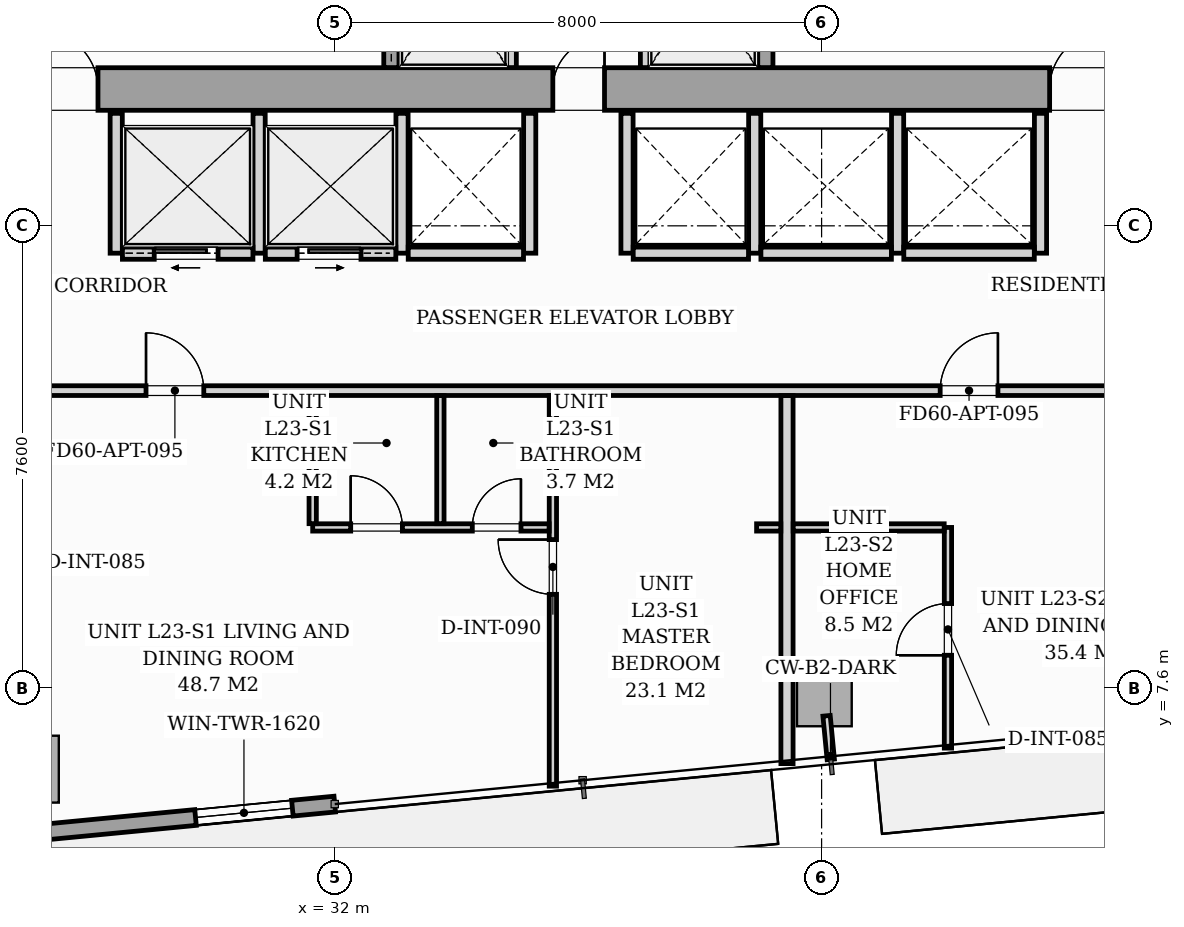
"""IFC4 building model, lengths in metres.
Left out: names, types, materials, properties, quantities, classifications, styles, units other than length and angle.
Written with IfcOpenShell. Run it as: python <this file> out.ifc"""

import sys

from ifc_helpers import new_model, si_unit, direction, frame, frame_2d, origin, origin_2d, place, context, subcontext, project, spatial, rectangle, i_section, extrude, source, transform, mapped, element, fill, save


model = new_model("IFC4")
c1 = context("Model", 3, precision=1e-05, world=origin(), true_north=direction((0.0, 1.0)))
c2 = subcontext(c1, "Body", "Model", "MODEL_VIEW")
j1 = project(units=[si_unit("LENGTHUNIT", "METRE"), si_unit("PLANEANGLEUNIT", "RADIAN")], contexts=[c1])
p1 = place(None, origin())
s1 = spatial("IfcSite", under=j1, at=p1, CompositionType="ELEMENT")
p2 = place(p1, origin())
s2 = spatial("IfcBuilding", under=s1, at=p2, CompositionType="ELEMENT")
p3 = place(p2, frame((0.0, 0.0, 84.2)))
s3 = spatial("IfcBuildingStorey", under=s2, at=p3, CompositionType="ELEMENT", Elevation=84.2)
m1 = source(origin(), c2, "Body", "SweptSolid", [
    extrude(i_section(OverallWidth=0.427, OverallDepth=0.483, WebThickness=0.051, FlangeThickness=0.082, FilletRadius=0.018, at=origin_2d()), origin(), (0.0, 0.0, 1.0), 3.196),
])
for number, where, z_axis, x_axis in (
    (1, (33.12, 17.4, 0.002), (0.0, 0.0, 1.0), (1.0, 0.0, 0.0)),
    (2, (38.88, 17.4, 0.002), (0.0, 0.0, 1.0), (1.0, 0.0, 0.0)),
):
    element("IfcColumn", number, at=place(p3, frame(where, z_axis=z_axis, x_axis=x_axis)), inside=s3, PredefinedType="PILASTER", context=c2, shape_type="MappedRepresentation", body=[
        mapped(m1, transform((0.0, 0.0, 0.0), scale=1.0)),
    ])
m2 = source(origin(), c2, "Body", "SweptSolid", [
    extrude(rectangle(XDim=0.9, YDim=1.1, at=origin_2d()), origin(), (0.0, 0.0, 1.0), 3.196),
])
for number, where, z_axis, x_axis in (
    (3, (27.006, 6.265, 0.002), (0.0, 0.0, 1.0), (0.995, 0.096, 0.0)),
    (4, (40.045, 7.521, 0.002), (0.0, 0.0, 1.0), (0.995, 0.096, 0.0)),
):
    element("IfcColumn", number, at=place(p3, frame(where, z_axis=z_axis, x_axis=x_axis)), inside=s3, PredefinedType="COLUMN", context=c2, shape_type="MappedRepresentation", body=[
        mapped(m2, transform((0.0, 0.0, 0.0), scale=1.0)),
    ])
p4 = place(p3, frame((31.994, 5.69, 0.0), z_axis=(0.0, 0.0, 1.0), x_axis=(-0.995396521236, -0.095842399342, 0.0)))
e5 = element("IfcWall", 5, at=p4, inside=s3, PredefinedType="STANDARD", context=c2, shape_type="SweptSolid", body=[
    extrude(rectangle(XDim=19.11, YDim=0.26, at=frame_2d((9.555, 0.0))), origin(), (0.0, 0.0, 1.0), 2.94),
])
p5 = place(p4, frame((7.49, 0.0, 0.0)))
e6 = element("IfcOpeningElement", 6, at=p5, cuts=e5, PredefinedType="OPENING", context=c2, shape_type="SweptSolid", body=[
    extrude(rectangle(XDim=1.8, YDim=2.06, at=frame_2d((0.9, 1.03))), frame((0.0, 0.14, 0.0), z_axis=(0.0, -1.0, 0.0), x_axis=(1.0, 0.0, 0.0)), (0.0, 0.0, 1.0), 0.28),
])
p6 = place(p4, frame((0.7, 0.0, 0.65)))
e7 = element("IfcOpeningElement", 7, at=p6, cuts=e5, PredefinedType="OPENING", context=c2, shape_type="SweptSolid", body=[
    extrude(rectangle(XDim=1.6, YDim=1.5, at=frame_2d((0.8, 0.75))), frame((0.0, 0.14, 0.0), z_axis=(0.0, -1.0, 0.0), x_axis=(1.0, 0.0, 0.0)), (0.0, 0.0, 1.0), 0.28),
])
p7 = place(p3, frame((26.1, 17.45, 0.0), z_axis=(0.0, 0.0, 1.0), x_axis=(1.0, 0.0, 0.0)))
e8 = element("IfcWall", 8, at=p7, inside=s3, PredefinedType="SHEAR", context=c2, shape_type="SweptSolid", body=[
    extrude(rectangle(XDim=19.8, YDim=0.7, at=frame_2d((9.9, 0.0))), origin(), (0.0, 0.0, 1.0), 3.2),
])
p8 = place(p7, frame((1.05, 0.0, 0.0)))
e9 = element("IfcOpeningElement", 9, at=p8, cuts=e8, PredefinedType="OPENING", context=c2, shape_type="SweptSolid", body=[
    extrude(rectangle(XDim=0.95, YDim=2.06, at=frame_2d((0.475, 1.03))), frame((0.0, 0.36, 0.0), z_axis=(0.0, -1.0, 0.0), x_axis=(1.0, 0.0, 0.0)), (0.0, 0.0, 1.0), 0.72),
])
p9 = place(p7, frame((9.48, 0.0, 0.0)))
e10 = element("IfcOpeningElement", 10, at=p9, cuts=e8, PredefinedType="OPENING", context=c2, shape_type="SweptSolid", body=[
    extrude(rectangle(XDim=0.85, YDim=2.0, at=frame_2d((0.425, 1.0))), frame((0.0, 0.36, 0.0), z_axis=(0.0, -1.0, 0.0), x_axis=(1.0, 0.0, 0.0)), (0.0, 0.0, 1.0), 0.72),
])
p10 = place(p7, frame((17.65, 0.0, 0.0)))
e11 = element("IfcOpeningElement", 11, at=p10, cuts=e8, PredefinedType="OPENING", context=c2, shape_type="SweptSolid", body=[
    extrude(rectangle(XDim=0.95, YDim=2.06, at=frame_2d((0.475, 1.03))), frame((0.0, 0.36, 0.0), z_axis=(0.0, -1.0, 0.0), x_axis=(1.0, 0.0, 0.0)), (0.0, 0.0, 1.0), 0.72),
])
p11 = place(p3, frame((32.925, 17.802, 0.0), z_axis=(0.0, 0.0, 1.0), x_axis=(0.0, 1.0, 0.0)))
e12 = element("IfcWall", 12, at=p11, inside=s3, PredefinedType="SOLIDWALL", context=c2, shape_type="SweptSolid", body=[
    extrude(rectangle(XDim=2.646, YDim=0.25, at=frame_2d((1.323, 0.0))), origin(), (0.0, 0.0, 1.0), 3.2),
])
p12 = place(p11, frame((0.598, 0.0, 0.0)))
e13 = element("IfcOpeningElement", 13, at=p12, cuts=e12, PredefinedType="OPENING", context=c2, shape_type="SweptSolid", body=[
    extrude(rectangle(XDim=1.1, YDim=2.08, at=frame_2d((0.55, 1.04))), frame((0.0, 0.135, 0.0), z_axis=(0.0, -1.0, 0.0), x_axis=(1.0, 0.0, 0.0)), (0.0, 0.0, 1.0), 0.27),
])
for number, where, z_axis, x_axis in (
    (14, (34.9, 17.802, 0.0), (0.0, 0.0, 1.0), (0.0, 1.0, 0.0)),
    (15, (37.1, 17.802, 0.0), (0.0, 0.0, 1.0), (0.0, 1.0, 0.0)),
):
    element("IfcWall", number, at=place(p3, frame(where, z_axis=z_axis, x_axis=x_axis)), inside=s3, PredefinedType="PARTITIONING", context=c2, shape_type="SweptSolid", body=[
        extrude(rectangle(XDim=2.646, YDim=0.16, at=frame_2d((1.323, 0.0))), origin(), (0.0, 0.0, 1.0), 2.94),
    ])
p13 = place(p3, frame((39.075, 17.802, 0.0), z_axis=(0.0, 0.0, 1.0), x_axis=(0.0, 1.0, 0.0)))
e16 = element("IfcWall", 16, at=p13, inside=s3, PredefinedType="SOLIDWALL", context=c2, shape_type="SweptSolid", body=[
    extrude(rectangle(XDim=2.646, YDim=0.25, at=frame_2d((1.323, 0.0))), origin(), (0.0, 0.0, 1.0), 3.2),
])
p14 = place(p13, frame((0.598, 0.0, 0.0)))
e17 = element("IfcOpeningElement", 17, at=p14, cuts=e16, PredefinedType="OPENING", context=c2, shape_type="SweptSolid", body=[
    extrude(rectangle(XDim=1.1, YDim=2.08, at=frame_2d((0.55, 1.04))), frame((0.0, 0.135, 0.0), z_axis=(0.0, -1.0, 0.0), x_axis=(1.0, 0.0, 0.0)), (0.0, 0.0, 1.0), 0.27),
])
for number, where, z_axis, x_axis in (
    (18, (28.4, 14.75, 0.0), (0.0, 0.0, 1.0), (0.0, 1.0, 0.0)),
    (19, (30.75, 14.75, 0.0), (0.0, 0.0, 1.0), (0.0, 1.0, 0.0)),
    (20, (33.1, 14.75, 0.0), (0.0, 0.0, 1.0), (0.0, 1.0, 0.0)),
):
    element("IfcWall", number, at=place(p3, frame(where, z_axis=z_axis, x_axis=x_axis)), inside=s3, PredefinedType="PARTITIONING", context=c2, shape_type="SweptSolid", body=[
        extrude(rectangle(XDim=2.3, YDim=0.2, at=frame_2d((1.15, 0.0))), origin(), (0.0, 0.0, 1.0), 2.94),
    ])
p15 = place(p3, frame((28.502, 14.75, 0.0), z_axis=(0.0, 0.0, 1.0), x_axis=(1.0, 0.0, 0.0)))
e21 = element("IfcWall", 21, at=p15, inside=s3, PredefinedType="PARTITIONING", context=c2, shape_type="SweptSolid", body=[
    extrude(rectangle(XDim=2.146, YDim=0.2, at=frame_2d((1.073, 0.0))), origin(), (0.0, 0.0, 1.0), 2.94),
])
p16 = place(p15, frame((0.523, 0.0, 0.0)))
e22 = element("IfcOpeningElement", 22, at=p16, cuts=e21, PredefinedType="OPENING", context=c2, shape_type="SweptSolid", body=[
    extrude(rectangle(XDim=1.05, YDim=2.08, at=frame_2d((0.525, 1.04))), frame((0.0, 0.11, 0.0), z_axis=(0.0, -1.0, 0.0), x_axis=(1.0, 0.0, 0.0)), (0.0, 0.0, 1.0), 0.22),
])
p17 = place(p3, frame((30.852, 14.75, 0.0), z_axis=(0.0, 0.0, 1.0), x_axis=(1.0, 0.0, 0.0)))
e23 = element("IfcWall", 23, at=p17, inside=s3, PredefinedType="PARTITIONING", context=c2, shape_type="SweptSolid", body=[
    extrude(rectangle(XDim=2.146, YDim=0.2, at=frame_2d((1.073, 0.0))), origin(), (0.0, 0.0, 1.0), 2.94),
])
p18 = place(p17, frame((0.523, 0.0, 0.0)))
e24 = element("IfcOpeningElement", 24, at=p18, cuts=e23, PredefinedType="OPENING", context=c2, shape_type="SweptSolid", body=[
    extrude(rectangle(XDim=1.05, YDim=2.08, at=frame_2d((0.525, 1.04))), frame((0.0, 0.11, 0.0), z_axis=(0.0, -1.0, 0.0), x_axis=(1.0, 0.0, 0.0)), (0.0, 0.0, 1.0), 0.22),
])
p19 = place(p3, frame((35.2, 14.75, 0.0), z_axis=(0.0, 0.0, 1.0), x_axis=(0.0, 1.0, 0.0)))
e25 = element("IfcWall", 25, at=p19, inside=s3, PredefinedType="PARTITIONING", context=c2, shape_type="SweptSolid", body=[
    extrude(rectangle(XDim=2.3, YDim=0.2, at=frame_2d((1.15, 0.0))), origin(), (0.0, 0.0, 1.0), 2.94),
])
p20 = place(p3, frame((33.202, 14.75, 0.0), z_axis=(0.0, 0.0, 1.0), x_axis=(1.0, 0.0, 0.0)))
e26 = element("IfcWall", 26, at=p20, inside=s3, PredefinedType="PARTITIONING", context=c2, shape_type="SweptSolid", body=[
    extrude(rectangle(XDim=1.896, YDim=0.2, at=frame_2d((0.948, 0.0))), origin(), (0.0, 0.0, 1.0), 2.94),
])
for number, where, z_axis, x_axis in (
    (27, (36.8, 14.75, 0.0), (0.0, 0.0, 1.0), (0.0, 1.0, 0.0)),
    (28, (38.9, 14.75, 0.0), (0.0, 0.0, 1.0), (0.0, 1.0, 0.0)),
):
    element("IfcWall", number, at=place(p3, frame(where, z_axis=z_axis, x_axis=x_axis)), inside=s3, PredefinedType="PARTITIONING", context=c2, shape_type="SweptSolid", body=[
        extrude(rectangle(XDim=2.3, YDim=0.2, at=frame_2d((1.15, 0.0))), origin(), (0.0, 0.0, 1.0), 2.94),
    ])
p21 = place(p3, frame((36.902, 14.75, 0.0), z_axis=(0.0, 0.0, 1.0), x_axis=(1.0, 0.0, 0.0)))
e29 = element("IfcWall", 29, at=p21, inside=s3, PredefinedType="PARTITIONING", context=c2, shape_type="SweptSolid", body=[
    extrude(rectangle(XDim=1.896, YDim=0.2, at=frame_2d((0.948, 0.0))), origin(), (0.0, 0.0, 1.0), 2.94),
])
for number, where, z_axis, x_axis in (
    (30, (41.25, 14.75, 0.0), (0.0, 0.0, 1.0), (0.0, 1.0, 0.0)),
    (31, (43.6, 14.75, 0.0), (0.0, 0.0, 1.0), (0.0, 1.0, 0.0)),
):
    element("IfcWall", number, at=place(p3, frame(where, z_axis=z_axis, x_axis=x_axis)), inside=s3, PredefinedType="PARTITIONING", context=c2, shape_type="SweptSolid", body=[
        extrude(rectangle(XDim=2.3, YDim=0.2, at=frame_2d((1.15, 0.0))), origin(), (0.0, 0.0, 1.0), 2.94),
    ])
for number, where, z_axis, x_axis in (
    (32, (39.002, 14.75, 0.0), (0.0, 0.0, 1.0), (1.0, 0.0, 0.0)),
    (33, (41.352, 14.75, 0.0), (0.0, 0.0, 1.0), (1.0, 0.0, 0.0)),
):
    element("IfcWall", number, at=place(p3, frame(where, z_axis=z_axis, x_axis=x_axis)), inside=s3, PredefinedType="PARTITIONING", context=c2, shape_type="SweptSolid", body=[
        extrude(rectangle(XDim=2.146, YDim=0.2, at=frame_2d((1.073, 0.0))), origin(), (0.0, 0.0, 1.0), 2.94),
    ])
p22 = place(p3, frame((17.7, 12.49, 0.0), z_axis=(0.0, 0.0, 1.0), x_axis=(1.0, 0.0, 0.0)))
e34 = element("IfcWall", 34, at=p22, inside=s3, PredefinedType="PARTITIONING", context=c2, shape_type="SweptSolid", body=[
    extrude(rectangle(XDim=35.4, YDim=0.16, at=frame_2d((17.7, 0.0))), origin(), (0.0, 0.0, 1.0), 2.94),
])
p23 = place(p22, frame((11.19, 0.0, 0.0)))
e35 = element("IfcOpeningElement", 35, at=p23, cuts=e34, PredefinedType="OPENING", context=c2, shape_type="SweptSolid", body=[
    extrude(rectangle(XDim=0.95, YDim=2.06, at=frame_2d((0.475, 1.03))), frame((0.0, 0.09, 0.0), z_axis=(0.0, -1.0, 0.0), x_axis=(1.0, 0.0, 0.0)), (0.0, 0.0, 1.0), 0.18),
])
p24 = place(p22, frame((24.25, 0.0, 0.0)))
e36 = element("IfcOpeningElement", 36, at=p24, cuts=e34, PredefinedType="OPENING", context=c2, shape_type="SweptSolid", body=[
    extrude(rectangle(XDim=0.95, YDim=2.06, at=frame_2d((0.475, 1.03))), frame((0.0, 0.09, 0.0), z_axis=(0.0, -1.0, 0.0), x_axis=(1.0, 0.0, 0.0)), (0.0, 0.0, 1.0), 0.18),
])
p25 = place(p3, frame((35.581, 5.986, 0.0), z_axis=(0.0, 0.0, 1.0), x_axis=(0.0, 1.0, 0.0)))
e37 = element("IfcWall", 37, at=p25, inside=s3, PredefinedType="PARTITIONING", context=c2, shape_type="SweptSolid", body=[
    extrude(rectangle(XDim=6.422, YDim=0.12, at=frame_2d((3.211, 0.0))), origin(), (0.0, 0.0, 1.0), 2.94),
])
p26 = place(p25, frame((3.154, 0.0, 0.0)))
e38 = element("IfcOpeningElement", 38, at=p26, cuts=e37, PredefinedType="OPENING", context=c2, shape_type="SweptSolid", body=[
    extrude(rectangle(XDim=0.9, YDim=2.05, at=frame_2d((0.45, 1.025))), frame((0.0, 0.07, 0.0), z_axis=(0.0, -1.0, 0.0), x_axis=(1.0, 0.0, 0.0)), (0.0, 0.0, 1.0), 0.14),
])
p27 = place(p3, frame((31.631, 10.24, 0.0), z_axis=(0.0, 0.0, 1.0), x_axis=(1.0, 0.0, 0.0)))
e39 = element("IfcWall", 39, at=p27, inside=s3, PredefinedType="PARTITIONING", context=c2, shape_type="SweptSolid", body=[
    extrude(rectangle(XDim=3.888, YDim=0.12, at=frame_2d((1.944, 0.0))), origin(), (0.0, 0.0, 1.0), 2.94),
])
p28 = place(p27, frame((0.625, 0.0, 0.0)))
e40 = element("IfcOpeningElement", 40, at=p28, cuts=e39, PredefinedType="OPENING", context=c2, shape_type="SweptSolid", body=[
    extrude(rectangle(XDim=0.85, YDim=2.05, at=frame_2d((0.425, 1.025))), frame((0.0, 0.07, 0.0), z_axis=(0.0, -1.0, 0.0), x_axis=(1.0, 0.0, 0.0)), (0.0, 0.0, 1.0), 0.14),
])
p29 = place(p27, frame((2.625, 0.0, 0.0)))
e41 = element("IfcOpeningElement", 41, at=p29, cuts=e39, PredefinedType="OPENING", context=c2, shape_type="SweptSolid", body=[
    extrude(rectangle(XDim=0.8, YDim=2.02, at=frame_2d((0.4, 1.01))), frame((0.0, 0.07, 0.0), z_axis=(0.0, -1.0, 0.0), x_axis=(1.0, 0.0, 0.0)), (0.0, 0.0, 1.0), 0.14),
])
for number, where, z_axis, x_axis in (
    (42, (33.731, 10.302, 0.0), (0.0, 0.0, 1.0), (0.0, 1.0, 0.0)),
    (43, (31.631, 10.302, 0.0), (0.0, 0.0, 1.0), (0.0, 1.0, 0.0)),
):
    element("IfcWall", number, at=place(p3, frame(where, z_axis=z_axis, x_axis=x_axis)), inside=s3, PredefinedType="PARTITIONING", context=c2, shape_type="SweptSolid", body=[
        extrude(rectangle(XDim=2.106, YDim=0.12, at=frame_2d((1.053, 0.0))), origin(), (0.0, 0.0, 1.0), 2.94),
    ])
p30 = place(p3, frame((39.431, 6.356, 0.0), z_axis=(0.0, 0.0, 1.0), x_axis=(0.0, 1.0, 0.0)))
e44 = element("IfcWall", 44, at=p30, inside=s3, PredefinedType="PARTITIONING", context=c2, shape_type="SweptSolid", body=[
    extrude(rectangle(XDim=6.052, YDim=0.2, at=frame_2d((3.026, 0.0))), origin(), (0.0, 0.0, 1.0), 2.94),
])
p31 = place(p3, frame((42.078, 6.611, 0.0), z_axis=(0.0, 0.0, 1.0), x_axis=(0.0, 1.0, 0.0)))
e45 = element("IfcWall", 45, at=p31, inside=s3, PredefinedType="PARTITIONING", context=c2, shape_type="SweptSolid", body=[
    extrude(rectangle(XDim=3.629, YDim=0.12, at=frame_2d((1.814, 0.0))), origin(), (0.0, 0.0, 1.0), 2.94),
])
p32 = place(p31, frame((1.527, 0.0, 0.0)))
e46 = element("IfcOpeningElement", 46, at=p32, cuts=e45, PredefinedType="OPENING", context=c2, shape_type="SweptSolid", body=[
    extrude(rectangle(XDim=0.85, YDim=2.05, at=frame_2d((0.425, 1.025))), frame((0.0, 0.07, 0.0), z_axis=(0.0, -1.0, 0.0), x_axis=(1.0, 0.0, 0.0)), (0.0, 0.0, 1.0), 0.14),
])
p33 = place(p3, frame((38.931, 10.24, 0.0), z_axis=(0.0, 0.0, 1.0), x_axis=(1.0, 0.0, 0.0)))
e47 = element("IfcWall", 47, at=p33, inside=s3, PredefinedType="PARTITIONING", context=c2, shape_type="SweptSolid", body=[
    extrude(rectangle(XDim=0.398, YDim=0.12, at=frame_2d((0.199, 0.0))), origin(), (0.0, 0.0, 1.0), 2.94),
])
p34 = place(p3, frame((39.533, 10.24, 0.0), z_axis=(0.0, 0.0, 1.0), x_axis=(1.0, 0.0, 0.0)))
e48 = element("IfcWall", 48, at=p34, inside=s3, PredefinedType="PARTITIONING", context=c2, shape_type="SweptSolid", body=[
    extrude(rectangle(XDim=2.483, YDim=0.12, at=frame_2d((1.242, 0.0))), origin(), (0.0, 0.0, 1.0), 2.94),
])
p35 = place(p3, frame((40.082, 7.142, 0.0), z_axis=(0.0, 0.0, 1.0), x_axis=(0.095944965663, -0.995386640238, 0.0)))
e49 = element("IfcWall", 49, at=p35, inside=s3, PredefinedType="PARTITIONING", context=c2, shape_type="SweptSolid", body=[
    extrude(rectangle(XDim=0.72, YDim=0.12, at=frame_2d((0.36, 0.0))), origin(), (0.0, 0.0, 1.0), 2.94),
])
m3 = source(origin(), c2, "Body", "SweptSolid", [
    extrude(rectangle(XDim=1.6, YDim=1.5, at=frame_2d((0.8, 0.75))), frame((0.0, 0.03, 0.0), z_axis=(0.0, -1.0, 0.0), x_axis=(1.0, 0.0, 0.0)), (0.0, 0.0, 1.0), 0.06),
])
p36 = place(p6, origin())
e50 = element("IfcWindow", 50, at=p36, inside=s3, PartitioningType="SINGLE_PANEL", PredefinedType="WINDOW", context=c2, shape_type="MappedRepresentation", body=[
    mapped(m3, transform((0.0, 0.0, 0.0), scale=1.0)),
])
fill(e7, e50)
m4 = source(origin(), c2, "Body", "SweptSolid", [
    extrude(rectangle(XDim=0.95, YDim=2.06, at=frame_2d((0.475, 1.03))), frame((0.0, 0.025, 0.0), z_axis=(0.0, -1.0, 0.0), x_axis=(1.0, 0.0, 0.0)), (0.0, 0.0, 1.0), 0.05),
])
p37 = place(p8, origin())
e51 = element("IfcDoor", 51, at=p37, inside=s3, OperationType="SINGLE_SWING_LEFT", PredefinedType="DOOR", context=c2, shape_type="MappedRepresentation", body=[
    mapped(m4, transform((0.0, 0.0, 0.0), scale=1.0)),
])
fill(e9, e51)
m5 = source(origin(), c2, "Body", "SweptSolid", [
    extrude(rectangle(XDim=0.85, YDim=2.0, at=frame_2d((0.425, 1.0))), frame((0.0, 0.025, 0.0), z_axis=(0.0, -1.0, 0.0), x_axis=(1.0, 0.0, 0.0)), (0.0, 0.0, 1.0), 0.05),
])
p38 = place(p9, origin())
e52 = element("IfcDoor", 52, at=p38, inside=s3, OperationType="SINGLE_SWING_RIGHT", PredefinedType="DOOR", context=c2, shape_type="MappedRepresentation", body=[
    mapped(m5, transform((0.0, 0.0, 0.0), scale=1.0)),
])
fill(e10, e52)
p39 = place(p10, origin())
e53 = element("IfcDoor", 53, at=p39, inside=s3, OperationType="SINGLE_SWING_RIGHT", PredefinedType="DOOR", context=c2, shape_type="MappedRepresentation", body=[
    mapped(m4, transform((0.0, 0.0, 0.0), scale=1.0)),
])
fill(e11, e53)
m6 = source(origin(), c2, "Body", "SweptSolid", [
    extrude(rectangle(XDim=1.05, YDim=2.08, at=frame_2d((0.525, 1.04))), frame((0.0, 0.025, 0.0), z_axis=(0.0, -1.0, 0.0), x_axis=(1.0, 0.0, 0.0)), (0.0, 0.0, 1.0), 0.05),
])
p40 = place(p16, origin())
e54 = element("IfcDoor", 54, at=p40, inside=s3, OperationType="SLIDING_TO_LEFT", PredefinedType="DOOR", context=c2, shape_type="MappedRepresentation", body=[
    mapped(m6, transform((0.0, 0.0, 0.0), scale=1.0)),
])
fill(e22, e54)
p41 = place(p18, origin())
e55 = element("IfcDoor", 55, at=p41, inside=s3, OperationType="SLIDING_TO_RIGHT", PredefinedType="DOOR", context=c2, shape_type="MappedRepresentation", body=[
    mapped(m6, transform((0.0, 0.0, 0.0), scale=1.0)),
])
fill(e24, e55)
m7 = source(origin(), c2, "Body", "SweptSolid", [
    extrude(rectangle(XDim=0.95, YDim=2.06, at=frame_2d((0.475, 1.03))), frame((0.0, 0.025, 0.0), z_axis=(0.0, -1.0, 0.0), x_axis=(1.0, 0.0, 0.0)), (0.0, 0.0, 1.0), 0.05),
])
p42 = place(p23, origin())
e56 = element("IfcDoor", 56, at=p42, inside=s3, OperationType="SINGLE_SWING_LEFT", PredefinedType="DOOR", context=c2, shape_type="MappedRepresentation", body=[
    mapped(m7, transform((0.0, 0.0, 0.0), scale=1.0)),
])
fill(e35, e56)
m8 = source(origin(), c2, "Body", "SweptSolid", [
    extrude(rectangle(XDim=0.9, YDim=2.05, at=frame_2d((0.45, 1.025))), frame((0.0, 0.025, 0.0), z_axis=(0.0, -1.0, 0.0), x_axis=(1.0, 0.0, 0.0)), (0.0, 0.0, 1.0), 0.05),
])
p43 = place(p26, origin())
e57 = element("IfcDoor", 57, at=p43, inside=s3, OperationType="SINGLE_SWING_RIGHT", PredefinedType="DOOR", context=c2, shape_type="MappedRepresentation", body=[
    mapped(m8, transform((0.0, 0.0, 0.0), scale=1.0)),
])
fill(e38, e57)
m9 = source(origin(), c2, "Body", "SweptSolid", [
    extrude(rectangle(XDim=0.85, YDim=2.05, at=frame_2d((0.425, 1.025))), frame((0.0, 0.025, 0.0), z_axis=(0.0, -1.0, 0.0), x_axis=(1.0, 0.0, 0.0)), (0.0, 0.0, 1.0), 0.05),
])
p44 = place(p28, origin())
e58 = element("IfcDoor", 58, at=p44, inside=s3, OperationType="SINGLE_SWING_LEFT", PredefinedType="DOOR", context=c2, shape_type="MappedRepresentation", body=[
    mapped(m9, transform((0.0, 0.0, 0.0), scale=1.0)),
])
fill(e40, e58)
m10 = source(origin(), c2, "Body", "SweptSolid", [
    extrude(rectangle(XDim=0.8, YDim=2.02, at=frame_2d((0.4, 1.01))), frame((0.0, 0.025, 0.0), z_axis=(0.0, -1.0, 0.0), x_axis=(1.0, 0.0, 0.0)), (0.0, 0.0, 1.0), 0.05),
])
p45 = place(p29, origin())
e59 = element("IfcDoor", 59, at=p45, inside=s3, OperationType="SINGLE_SWING_RIGHT", PredefinedType="DOOR", context=c2, shape_type="MappedRepresentation", body=[
    mapped(m10, transform((0.0, 0.0, 0.0), scale=1.0)),
])
fill(e41, e59)
p46 = place(p32, origin())
e60 = element("IfcDoor", 60, at=p46, inside=s3, OperationType="SINGLE_SWING_LEFT", PredefinedType="DOOR", context=c2, shape_type="MappedRepresentation", body=[
    mapped(m9, transform((0.0, 0.0, 0.0), scale=1.0)),
])
fill(e46, e60)
p47 = place(p24, origin())
e61 = element("IfcDoor", 61, at=p47, inside=s3, OperationType="SINGLE_SWING_RIGHT", PredefinedType="DOOR", context=c2, shape_type="MappedRepresentation", body=[
    mapped(m7, transform((0.0, 0.0, 0.0), scale=1.0)),
])
fill(e36, e61)
save(model, sys.argv[1])
